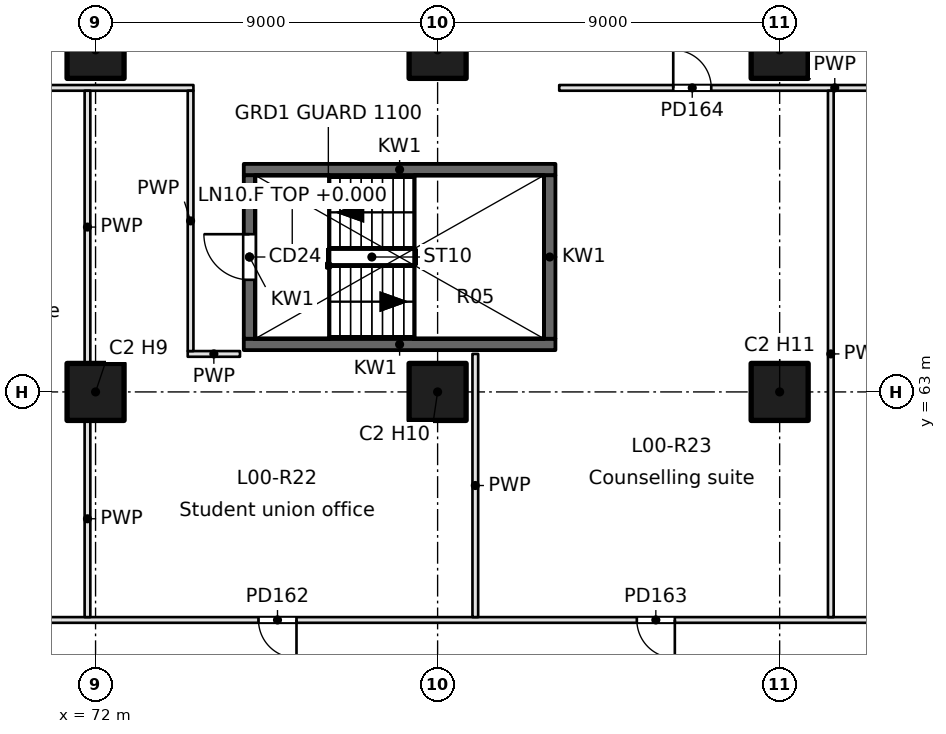
"""IFC4 building model, lengths in metres.
Left out: names, types, materials, properties, quantities, classifications, styles, units other than length and angle.
Written with IfcOpenShell. Run it as: python <this file> out.ifc"""

import sys

from ifc_helpers import new_model, si_unit, direction, frame, frame_2d, origin, origin_2d, place, context, subcontext, project, spatial, rectangle, extrude, element, fill, save


model = new_model("IFC4")
c1 = context("Model", 3, precision=1e-05, world=origin(), true_north=direction((0.0, 1.0)))
c2 = subcontext(c1, "Body", "Model", "MODEL_VIEW")
j1 = project(units=[si_unit("LENGTHUNIT", "METRE"), si_unit("PLANEANGLEUNIT", "RADIAN")], contexts=[c1])
p1 = place(None, origin())
s1 = spatial("IfcSite", under=j1, at=p1, CompositionType="ELEMENT")
p2 = place(p1, origin())
s2 = spatial("IfcBuilding", under=s1, at=p2, CompositionType="ELEMENT")
p3 = place(p2, origin())
s3 = spatial("IfcBuildingStorey", under=s2, at=p3, CompositionType="ELEMENT", Elevation=0.0)
for number, where, z_axis, x_axis in (
    (1, (72.0, 63.0, 0.0), (0.0, 0.0, 1.0), (1.0, 0.0, 0.0)),
    (2, (72.0, 72.0, 0.0), (0.0, 0.0, 1.0), (1.0, 0.0, 0.0)),
    (3, (81.0, 63.0, 0.0), (0.0, 0.0, 1.0), (1.0, 0.0, 0.0)),
    (4, (81.0, 72.0, 0.0), (0.0, 0.0, 1.0), (1.0, 0.0, 0.0)),
    (5, (90.0, 63.0, 0.0), (0.0, 0.0, 1.0), (1.0, 0.0, 0.0)),
    (6, (90.0, 72.0, 0.0), (0.0, 0.0, 1.0), (1.0, 0.0, 0.0)),
):
    element("IfcColumn", number, at=place(p3, frame(where, z_axis=z_axis, x_axis=x_axis)), inside=s3, PredefinedType="COLUMN", context=c2, shape_type="SweptSolid", body=[
        extrude(rectangle(XDim=1.5, YDim=1.5, at=origin_2d()), origin(), (0.0, 0.0, 1.0), 6.0),
    ])
for number, where, z_axis, x_axis in (
    (7, (75.9, 64.25, -0.4), (0.0, 0.0, 1.0), (1.0, 0.0, 0.0)),
    (8, (75.9, 68.85, -0.4), (0.0, 0.0, 1.0), (1.0, 0.0, 0.0)),
):
    element("IfcWall", number, at=place(p3, frame(where, z_axis=z_axis, x_axis=x_axis)), inside=s3, PredefinedType="SOLIDWALL", context=c2, shape_type="SweptSolid", body=[
        extrude(rectangle(XDim=8.2, YDim=0.3, at=frame_2d((4.1, 0.0))), origin(), (0.0, 0.0, 1.0), 6.05),
    ])
p4 = place(p3, frame((76.05, 64.4, -0.4), z_axis=(0.0, 0.0, 1.0), x_axis=(0.0, 1.0, 0.0)))
e9 = element("IfcWall", 9, at=p4, inside=s3, PredefinedType="SOLIDWALL", context=c2, shape_type="SweptSolid", body=[
    extrude(rectangle(XDim=4.3, YDim=0.3, at=frame_2d((2.15, 0.0))), origin(), (0.0, 0.0, 1.0), 6.05),
])
p5 = place(p4, frame((1.55, 0.0, 0.4)))
e10 = element("IfcOpeningElement", 10, at=p5, cuts=e9, PredefinedType="OPENING", context=c2, shape_type="SweptSolid", body=[
    extrude(rectangle(XDim=1.2, YDim=2.1, at=frame_2d((0.6, 1.05))), frame((0.0, 0.15, 0.0), z_axis=(0.0, -1.0, 0.0), x_axis=(1.0, 0.0, 0.0)), (0.0, 0.0, 1.0), 0.3),
])
p6 = place(p3, frame((83.95, 64.4, -0.4), z_axis=(0.0, 0.0, 1.0), x_axis=(0.0, 1.0, 0.0)))
e11 = element("IfcWall", 11, at=p6, inside=s3, PredefinedType="SOLIDWALL", context=c2, shape_type="SweptSolid", body=[
    extrude(rectangle(XDim=4.3, YDim=0.3, at=frame_2d((2.15, 0.0))), origin(), (0.0, 0.0, 1.0), 6.05),
])
p7 = place(p3, frame((74.425, 64.0, 0.0), z_axis=(0.0, 0.0, 1.0), x_axis=(1.0, 0.0, 0.0)))
e12 = element("IfcWall", 12, at=p7, inside=s3, PredefinedType="PARTITIONING", context=c2, shape_type="SweptSolid", body=[
    extrude(rectangle(XDim=1.375, YDim=0.15, at=frame_2d((0.688, 0.0))), origin(), (0.0, 0.0, 1.0), 5.65),
])
p8 = place(p3, frame((94.32, 57.0, 0.0), z_axis=(0.0, 0.0, 1.0), x_axis=(-1.0, 0.0, 0.0)))
e13 = element("IfcWall", 13, at=p8, inside=s3, PredefinedType="PARTITIONING", context=c2, shape_type="SweptSolid", body=[
    extrude(rectangle(XDim=49.395, YDim=0.15, at=frame_2d((24.698, 0.0))), origin(), (0.0, 0.0, 1.0), 5.65),
])
p9 = place(p8, frame((44.57, 0.0, 0.0)))
e14 = element("IfcOpeningElement", 14, at=p9, cuts=e13, PredefinedType="OPENING", context=c2, shape_type="SweptSolid", body=[
    extrude(rectangle(XDim=1.0, YDim=2.1, at=frame_2d((0.5, 1.05))), frame((0.0, 0.075, 0.0), z_axis=(0.0, -1.0, 0.0), x_axis=(1.0, 0.0, 0.0)), (0.0, 0.0, 1.0), 0.15),
])
p10 = place(p8, frame((34.566, 0.0, 0.0)))
e15 = element("IfcOpeningElement", 15, at=p10, cuts=e13, PredefinedType="OPENING", context=c2, shape_type="SweptSolid", body=[
    extrude(rectangle(XDim=1.0, YDim=2.1, at=frame_2d((0.5, 1.05))), frame((0.0, 0.075, 0.0), z_axis=(0.0, -1.0, 0.0), x_axis=(1.0, 0.0, 0.0)), (0.0, 0.0, 1.0), 0.15),
])
p11 = place(p8, frame((25.336, 0.0, 0.0)))
e16 = element("IfcOpeningElement", 16, at=p11, cuts=e13, PredefinedType="OPENING", context=c2, shape_type="SweptSolid", body=[
    extrude(rectangle(XDim=1.0, YDim=2.1, at=frame_2d((0.5, 1.05))), frame((0.0, 0.075, 0.0), z_axis=(0.0, -1.0, 0.0), x_axis=(1.0, 0.0, 0.0)), (0.0, 0.0, 1.0), 0.15),
])
p12 = place(p8, frame((17.033, 0.0, 0.0)))
e17 = element("IfcOpeningElement", 17, at=p12, cuts=e13, PredefinedType="OPENING", context=c2, shape_type="SweptSolid", body=[
    extrude(rectangle(XDim=1.0, YDim=2.1, at=frame_2d((0.5, 1.05))), frame((0.0, 0.075, 0.0), z_axis=(0.0, -1.0, 0.0), x_axis=(1.0, 0.0, 0.0)), (0.0, 0.0, 1.0), 0.15),
])
p13 = place(p8, frame((7.078, 0.0, 0.0)))
e18 = element("IfcOpeningElement", 18, at=p13, cuts=e13, PredefinedType="OPENING", context=c2, shape_type="SweptSolid", body=[
    extrude(rectangle(XDim=1.0, YDim=2.1, at=frame_2d((0.5, 1.05))), frame((0.0, 0.075, 0.0), z_axis=(0.0, -1.0, 0.0), x_axis=(1.0, 0.0, 0.0)), (0.0, 0.0, 1.0), 0.15),
])
p14 = place(p3, frame((45.875, 71.0, 0.0), z_axis=(0.0, 0.0, 1.0), x_axis=(1.0, 0.0, 0.0)))
e19 = element("IfcWall", 19, at=p14, inside=s3, PredefinedType="PARTITIONING", context=c2, shape_type="SweptSolid", body=[
    extrude(rectangle(XDim=28.7, YDim=0.15, at=frame_2d((14.35, 0.0))), origin(), (0.0, 0.0, 1.0), 5.65),
])
p15 = place(p14, frame((3.25, 0.0, 0.0)))
e20 = element("IfcOpeningElement", 20, at=p15, cuts=e19, PredefinedType="OPENING", context=c2, shape_type="SweptSolid", body=[
    extrude(rectangle(XDim=1.0, YDim=2.1, at=frame_2d((0.5, 1.05))), frame((0.0, 0.075, 0.0), z_axis=(0.0, -1.0, 0.0), x_axis=(1.0, 0.0, 0.0)), (0.0, 0.0, 1.0), 0.15),
])
p16 = place(p14, frame((12.879, 0.0, 0.0)))
e21 = element("IfcOpeningElement", 21, at=p16, cuts=e19, PredefinedType="OPENING", context=c2, shape_type="SweptSolid", body=[
    extrude(rectangle(XDim=1.0, YDim=2.1, at=frame_2d((0.5, 1.05))), frame((0.0, 0.075, 0.0), z_axis=(0.0, -1.0, 0.0), x_axis=(1.0, 0.0, 0.0)), (0.0, 0.0, 1.0), 0.15),
])
p17 = place(p3, frame((84.2, 71.0, 0.0), z_axis=(0.0, 0.0, 1.0), x_axis=(1.0, 0.0, 0.0)))
e22 = element("IfcWall", 22, at=p17, inside=s3, PredefinedType="PARTITIONING", context=c2, shape_type="SweptSolid", body=[
    extrude(rectangle(XDim=14.5, YDim=0.15, at=frame_2d((7.25, 0.0))), origin(), (0.0, 0.0, 1.0), 5.65),
])
p18 = place(p17, frame((3.0, 0.0, 0.0)))
e23 = element("IfcOpeningElement", 23, at=p18, cuts=e22, PredefinedType="OPENING", context=c2, shape_type="SweptSolid", body=[
    extrude(rectangle(XDim=1.0, YDim=2.1, at=frame_2d((0.5, 1.05))), frame((0.0, 0.075, 0.0), z_axis=(0.0, -1.0, 0.0), x_axis=(1.0, 0.0, 0.0)), (0.0, 0.0, 1.0), 0.15),
])
p19 = place(p17, frame((9.896, 0.0, 0.0)))
e24 = element("IfcOpeningElement", 24, at=p19, cuts=e22, PredefinedType="OPENING", context=c2, shape_type="SweptSolid", body=[
    extrude(rectangle(XDim=1.8, YDim=2.1, at=frame_2d((0.9, 1.05))), frame((0.0, 0.075, 0.0), z_axis=(0.0, -1.0, 0.0), x_axis=(1.0, 0.0, 0.0)), (0.0, 0.0, 1.0), 0.15),
])
p20 = place(p3, frame((71.787, 57.075, 0.0), z_axis=(0.0, 0.0, 1.0), x_axis=(0.0, 1.0, 0.0)))
e25 = element("IfcWall", 25, at=p20, inside=s3, PredefinedType="PARTITIONING", context=c2, shape_type="SweptSolid", body=[
    extrude(rectangle(XDim=5.175, YDim=0.15, at=frame_2d((2.587, 0.0))), origin(), (0.0, 0.0, 1.0), 5.65),
])
p21 = place(p3, frame((71.787, 63.75, 0.0), z_axis=(0.0, 0.0, 1.0), x_axis=(0.0, 1.0, 0.0)))
e26 = element("IfcWall", 26, at=p21, inside=s3, PredefinedType="PARTITIONING", context=c2, shape_type="SweptSolid", body=[
    extrude(rectangle(XDim=7.175, YDim=0.15, at=frame_2d((3.587, 0.0))), origin(), (0.0, 0.0, 1.0), 5.65),
])
p22 = place(p3, frame((81.992, 57.075, 0.0), z_axis=(0.0, 0.0, 1.0), x_axis=(0.0, 1.0, 0.0)))
e27 = element("IfcWall", 27, at=p22, inside=s3, PredefinedType="PARTITIONING", context=c2, shape_type="SweptSolid", body=[
    extrude(rectangle(XDim=6.925, YDim=0.15, at=frame_2d((3.462, 0.0))), origin(), (0.0, 0.0, 1.0), 5.65),
])
p23 = place(p3, frame((74.5, 70.925, 0.0), z_axis=(0.0, 0.0, 1.0), x_axis=(0.0, -1.0, 0.0)))
e28 = element("IfcWall", 28, at=p23, inside=s3, PredefinedType="PARTITIONING", context=c2, shape_type="SweptSolid", body=[
    extrude(rectangle(XDim=6.85, YDim=0.15, at=frame_2d((3.425, 0.0))), origin(), (0.0, 0.0, 1.0), 5.65),
])
p24 = place(p3, frame((91.346, 57.075, 0.0), z_axis=(0.0, 0.0, 1.0), x_axis=(0.0, 1.0, 0.0)))
e29 = element("IfcWall", 29, at=p24, inside=s3, PredefinedType="PARTITIONING", context=c2, shape_type="SweptSolid", body=[
    extrude(rectangle(XDim=13.85, YDim=0.15, at=frame_2d((6.925, 0.0))), origin(), (0.0, 0.0, 1.0), 5.65),
])
p25 = place(p5, origin())
e30 = element("IfcDoor", 30, at=p25, inside=s3, OperationType="SINGLE_SWING_RIGHT", PredefinedType="DOOR", context=c2, shape_type="SweptSolid", body=[
    extrude(rectangle(XDim=1.2, YDim=2.1, at=frame_2d((0.6, 1.05))), frame((0.0, 0.025, 0.0), z_axis=(0.0, -1.0, 0.0), x_axis=(1.0, 0.0, 0.0)), (0.0, 0.0, 1.0), 0.05),
])
fill(e10, e30)
p26 = place(p12, origin())
e31 = element("IfcDoor", 31, at=p26, inside=s3, OperationType="SINGLE_SWING_LEFT", PredefinedType="DOOR", context=c2, shape_type="SweptSolid", body=[
    extrude(rectangle(XDim=1.0, YDim=2.1, at=frame_2d((0.5, 1.05))), frame((0.0, 0.025, 0.0), z_axis=(0.0, -1.0, 0.0), x_axis=(1.0, 0.0, 0.0)), (0.0, 0.0, 1.0), 0.05),
])
fill(e17, e31)
p27 = place(p13, origin())
e32 = element("IfcDoor", 32, at=p27, inside=s3, OperationType="SINGLE_SWING_LEFT", PredefinedType="DOOR", context=c2, shape_type="SweptSolid", body=[
    extrude(rectangle(XDim=1.0, YDim=2.1, at=frame_2d((0.5, 1.05))), frame((0.0, 0.025, 0.0), z_axis=(0.0, -1.0, 0.0), x_axis=(1.0, 0.0, 0.0)), (0.0, 0.0, 1.0), 0.05),
])
fill(e18, e32)
p28 = place(p18, origin())
e33 = element("IfcDoor", 33, at=p28, inside=s3, OperationType="SINGLE_SWING_LEFT", PredefinedType="DOOR", context=c2, shape_type="SweptSolid", body=[
    extrude(rectangle(XDim=1.0, YDim=2.1, at=frame_2d((0.5, 1.05))), frame((0.0, 0.025, 0.0), z_axis=(0.0, -1.0, 0.0), x_axis=(1.0, 0.0, 0.0)), (0.0, 0.0, 1.0), 0.05),
])
fill(e23, e33)
save(model, sys.argv[1])
